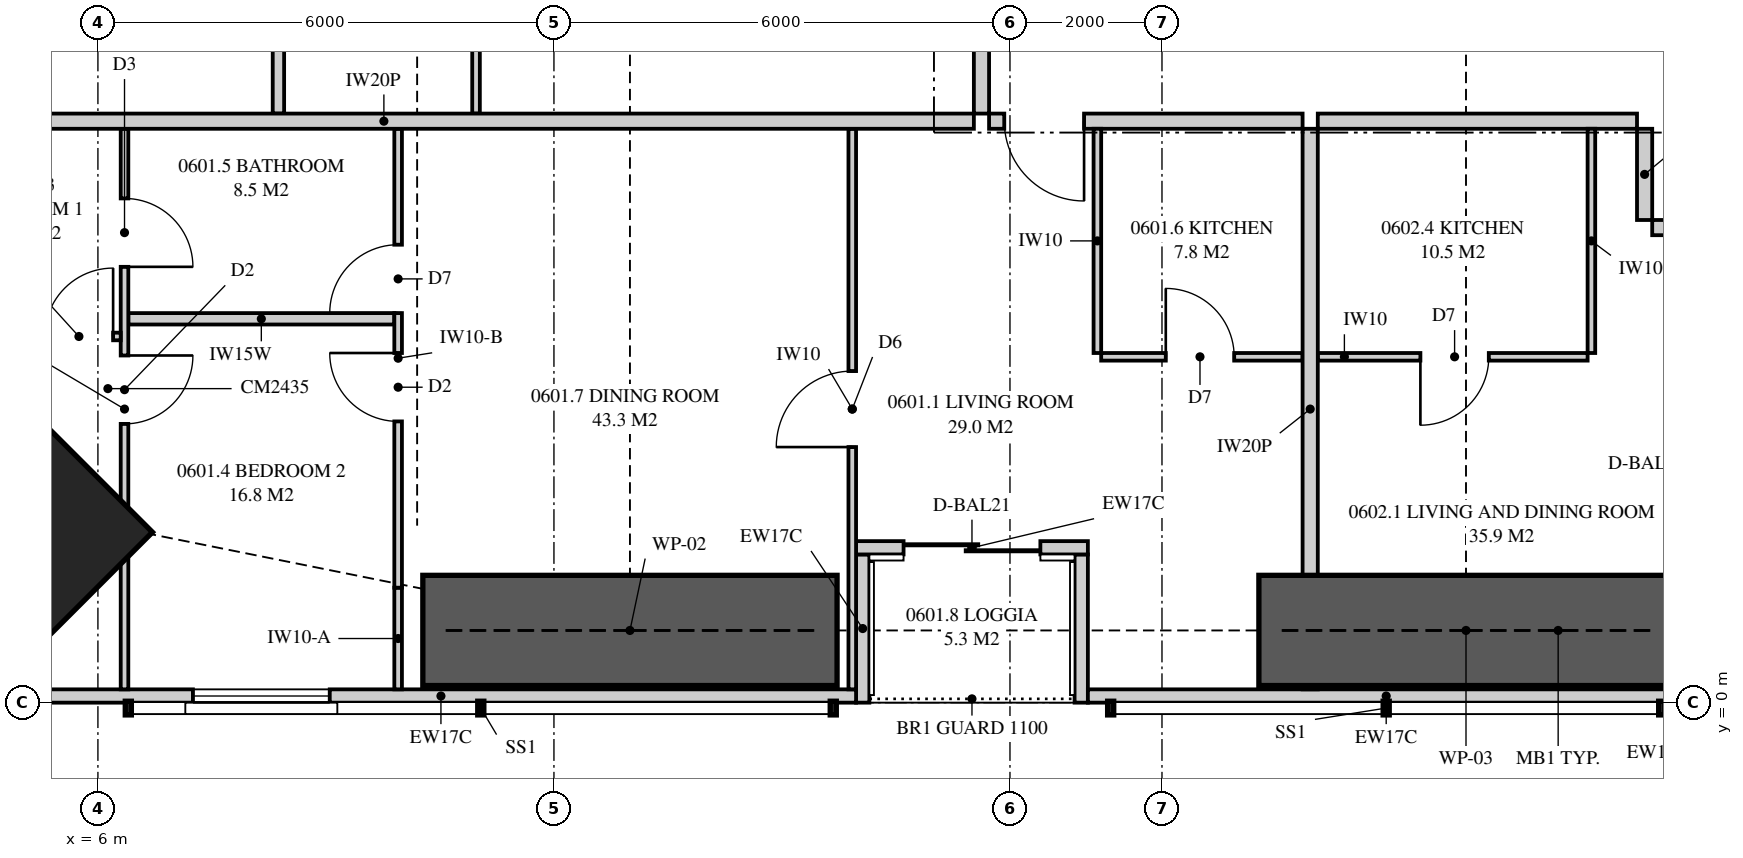
"""IFC4 building model, lengths in metres.
Left out: names, types, materials, properties, quantities, classifications, styles, units other than length and angle.
Written with IfcOpenShell. Run it as: python <this file> out.ifc"""

import sys

from ifc_helpers import new_model, si_unit, direction, frame, frame_2d, origin, origin_2d, place, context, subcontext, project, spatial, polyline, rectangle, outline, extrude, element, fill, save


model = new_model("IFC4")
c1 = context("Model", 3, precision=1e-05, world=origin(), true_north=direction((0.0, 1.0)))
c2 = subcontext(c1, "Body", "Model", "MODEL_VIEW")
j1 = project(units=[si_unit("LENGTHUNIT", "METRE"), si_unit("PLANEANGLEUNIT", "RADIAN")], contexts=[c1])
p1 = place(None, origin())
s1 = spatial("IfcSite", under=j1, at=p1, CompositionType="ELEMENT")
p2 = place(p1, origin())
s2 = spatial("IfcBuilding", under=s1, at=p2, CompositionType="ELEMENT")
p3 = place(p2, frame((0.0, 0.0, 27.7)))
s3 = spatial("IfcBuildingStorey", under=s2, at=p3, CompositionType="ELEMENT", Elevation=27.7)
p4 = place(p3, frame((4.631, 2.631, 0.0), z_axis=(0.0, 0.0, 1.0), x_axis=(0.707106781187, 0.707106781187, 0.0)))
e1 = element("IfcColumn", 1, at=p4, inside=s3, PredefinedType="COLUMN", context=c2, shape_type="SweptSolid", body=[
    extrude(rectangle(XDim=2.4, YDim=3.5, at=origin_2d()), origin(), (0.0, 0.0, 1.0), 3.35),
])
p5 = place(p3, frame((5.051, 0.087, 0.0), z_axis=(0.0, 0.0, 1.0), x_axis=(1.0, 0.0, 0.0)))
e2 = element("IfcWall", 2, at=p5, inside=s3, PredefinedType="SOLIDWALL", context=c2, shape_type="SweptSolid", body=[
    extrude(outline(polyline([(0.0, 0.0), (10.924, 0.0), (10.924, 2.15), (7.949, 2.15), (7.949, 3.11), (7.793, 3.11), (7.793, 2.15), (7.745, 2.15), (7.745, 3.11), (0.0, 3.11), (0.0, 0.0)])), frame((0.0, 0.087, 0.0), z_axis=(0.0, -1.0, 0.0), x_axis=(1.0, 0.0, 0.0)), (0.0, 0.0, 1.0), 0.175),
])
p6 = place(p5, frame((2.199, 0.0, 0.4)))
e3 = element("IfcOpeningElement", 3, at=p6, cuts=e2, PredefinedType="OPENING", context=c2, shape_type="SweptSolid", body=[
    extrude(rectangle(XDim=1.8, YDim=1.7, at=frame_2d((0.9, 0.85))), frame((0.0, 0.097, 0.0), z_axis=(0.0, -1.0, 0.0), x_axis=(1.0, 0.0, 0.0)), (0.0, 0.0, 1.0), 0.195),
])
p7 = place(p3, frame((19.025, 0.087, 0.0), z_axis=(0.0, 0.0, 1.0), x_axis=(1.0, 0.0, 0.0)))
e4 = element("IfcWall", 4, at=p7, inside=s3, PredefinedType="SOLIDWALL", context=c2, shape_type="SweptSolid", body=[
    extrude(rectangle(XDim=7.85, YDim=0.175, at=frame_2d((3.925, 0.0))), origin(), (0.0, 0.0, 1.0), 2.15),
])
p8 = place(p3, frame((15.975, 2.038, 0.0), z_axis=(0.0, 0.0, 1.0), x_axis=(1.0, 0.0, 0.0)))
e5 = element("IfcWall", 5, at=p8, inside=s3, PredefinedType="SOLIDWALL", context=c2, shape_type="SweptSolid", body=[
    extrude(rectangle(XDim=3.05, YDim=0.175, at=frame_2d((1.525, 0.0))), origin(), (0.0, 0.0, 1.0), 3.11),
])
p9 = place(p8, frame((0.625, 0.0, 0.0)))
e6 = element("IfcOpeningElement", 6, at=p9, cuts=e5, PredefinedType="OPENING", context=c2, shape_type="SweptSolid", body=[
    extrude(rectangle(XDim=1.8, YDim=2.1, at=frame_2d((0.9, 1.05))), frame((0.0, 0.097, 0.0), z_axis=(0.0, -1.0, 0.0), x_axis=(1.0, 0.0, 0.0)), (0.0, 0.0, 1.0), 0.195),
])
for number, where, z_axis, x_axis in (
    (7, (16.062, 0.0, 0.0), (0.0, 0.0, 1.0), (0.0, 1.0, 0.0)),
    (8, (18.938, 0.0, 0.0), (0.0, 0.0, 1.0), (0.0, 1.0, 0.0)),
):
    element("IfcWall", number, at=place(p3, frame(where, z_axis=z_axis, x_axis=x_axis)), inside=s3, PredefinedType="SOLIDWALL", context=c2, shape_type="SweptSolid", body=[
        extrude(outline(polyline([(0.0, 0.0), (1.95, 0.0), (1.95, 3.11), (1.75, 3.11), (1.75, 2.15), (0.15, 2.15), (0.15, 3.11), (0.0, 3.11), (0.0, 0.0)])), frame((0.0, 0.087, 0.0), z_axis=(0.0, -1.0, 0.0), x_axis=(1.0, 0.0, 0.0)), (0.0, 0.0, 1.0), 0.175),
    ])
p10 = place(p3, frame((21.95, 0.175, 0.0), z_axis=(0.0, 0.0, 1.0), x_axis=(0.0, 1.0, 0.0)))
e9 = element("IfcWall", 9, at=p10, inside=s3, PredefinedType="PARTITIONING", context=c2, shape_type="SweptSolid", body=[
    extrude(outline(polyline([(0.529, 2.15), (0.0, 2.15), (0.0, 0.0), (0.529, 0.0), (0.529, 0.09), (1.021, 0.09), (1.021, 0.0), (7.375, 0.0), (7.375, 3.11), (1.685, 3.11), (1.685, 2.15), (1.021, 2.15), (1.021, 2.06), (0.529, 2.06), (0.529, 2.15)])), frame((0.0, 0.1, 0.0), z_axis=(0.0, -1.0, 0.0), x_axis=(1.0, 0.0, 0.0)), (0.0, 0.0, 1.0), 0.2),
])
p11 = place(p3, frame((17.725, 7.65, 0.0), z_axis=(0.0, 0.0, 1.0), x_axis=(1.0, 0.0, 0.0)))
e10 = element("IfcWall", 10, at=p11, inside=s3, PredefinedType="PARTITIONING", context=c2, shape_type="SweptSolid", body=[
    extrude(rectangle(XDim=4.125, YDim=0.2, at=frame_2d((2.062, 0.0))), origin(), (0.0, 0.0, 1.0), 3.11),
])
p12 = place(p11, frame((0.2, 0.0, 0.0)))
e11 = element("IfcOpeningElement", 11, at=p12, cuts=e10, PredefinedType="OPENING", context=c2, shape_type="SweptSolid", body=[
    extrude(rectangle(XDim=1.05, YDim=2.2, at=frame_2d((0.525, 1.1))), frame((0.0, 0.11, 0.0), z_axis=(0.0, -1.0, 0.0), x_axis=(1.0, 0.0, 0.0)), (0.0, 0.0, 1.0), 0.22),
])
p13 = place(p3, frame((6.35, 0.175, 0.0), z_axis=(0.0, 0.0, 1.0), x_axis=(0.0, 1.0, 0.0)))
e12 = element("IfcWall", 12, at=p13, inside=s3, PredefinedType="PARTITIONING", context=c2, shape_type="SweptSolid", body=[
    extrude(outline(polyline([(0.0, 0.0), (7.375, 0.0), (7.375, 3.11), (2.988, 3.11), (2.988, 2.15), (1.234, 2.15), (1.234, 3.11), (0.0, 3.11), (0.0, 0.0)])), frame((0.0, 0.05, 0.0), z_axis=(0.0, -1.0, 0.0), x_axis=(1.0, 0.0, 0.0)), (0.0, 0.0, 1.0), 0.1),
])
p14 = place(p13, frame((3.492, 0.0, 0.0)))
e13 = element("IfcOpeningElement", 13, at=p14, cuts=e12, PredefinedType="OPENING", context=c2, shape_type="SweptSolid", body=[
    extrude(rectangle(XDim=0.9, YDim=2.1, at=frame_2d((0.45, 1.05))), frame((0.0, 0.06, 0.0), z_axis=(0.0, -1.0, 0.0), x_axis=(1.0, 0.0, 0.0)), (0.0, 0.0, 1.0), 0.12),
])
p15 = place(p13, frame((5.559, 0.0, 0.0)))
e14 = element("IfcOpeningElement", 14, at=p15, cuts=e12, PredefinedType="OPENING", context=c2, shape_type="SweptSolid", body=[
    extrude(rectangle(XDim=0.9, YDim=2.1, at=frame_2d((0.45, 1.05))), frame((0.0, 0.06, 0.0), z_axis=(0.0, -1.0, 0.0), x_axis=(1.0, 0.0, 0.0)), (0.0, 0.0, 1.0), 0.12),
])
p16 = place(p3, frame((9.95, 0.175, 0.0), z_axis=(0.0, 0.0, 1.0), x_axis=(0.0, 1.0, 0.0)))
e15 = element("IfcWall", 15, at=p16, inside=s3, PredefinedType="PARTITIONING", context=c2, shape_type="SweptSolid", body=[
    extrude(outline(polyline([(0.0, 0.0), (1.338, 0.0), (1.338, 2.15), (0.51, 2.15), (0.51, 3.11), (0.0, 3.11), (0.0, 0.0)])), frame((0.0, 0.05, 0.0), z_axis=(0.0, -1.0, 0.0), x_axis=(1.0, 0.0, 0.0)), (0.0, 0.0, 1.0), 0.1),
])
p17 = place(p3, frame((9.95, 1.513, 0.0), z_axis=(0.0, 0.0, 1.0), x_axis=(0.0, 1.0, 0.0)))
e16 = element("IfcWall", 16, at=p17, inside=s3, PredefinedType="PARTITIONING", context=c2, shape_type="SweptSolid", body=[
    extrude(outline(polyline([(0.0, 0.0), (6.037, 0.0), (6.037, 2.51), (0.927, 2.51), (0.927, 2.15), (0.0, 2.15), (0.0, 0.0)])), frame((0.0, 0.05, 0.0), z_axis=(0.0, -1.0, 0.0), x_axis=(1.0, 0.0, 0.0)), (0.0, 0.0, 1.0), 0.1),
])
p18 = place(p17, frame((2.188, 0.0, 0.0)))
e17 = element("IfcOpeningElement", 17, at=p18, cuts=e16, PredefinedType="OPENING", context=c2, shape_type="SweptSolid", body=[
    extrude(rectangle(XDim=0.9, YDim=2.1, at=frame_2d((0.45, 1.05))), frame((0.0, 0.06, 0.0), z_axis=(0.0, -1.0, 0.0), x_axis=(1.0, 0.0, 0.0)), (0.0, 0.0, 1.0), 0.12),
])
p19 = place(p17, frame((3.612, 0.0, 0.0)))
e18 = element("IfcOpeningElement", 18, at=p19, cuts=e16, PredefinedType="OPENING", context=c2, shape_type="SweptSolid", body=[
    extrude(rectangle(XDim=0.9, YDim=2.1, at=frame_2d((0.45, 1.05))), frame((0.0, 0.06, 0.0), z_axis=(0.0, -1.0, 0.0), x_axis=(1.0, 0.0, 0.0)), (0.0, 0.0, 1.0), 0.12),
])
p20 = place(p3, frame((2.0, 4.817, 0.0), z_axis=(0.0, 0.0, 1.0), x_axis=(1.0, 0.0, 0.0)))
e19 = element("IfcWall", 19, at=p20, inside=s3, PredefinedType="PARTITIONING", context=c2, shape_type="SweptSolid", body=[
    extrude(outline(polyline([(0.0, 0.0), (4.3, 0.0), (4.3, 3.11), (3.148, 3.11), (3.148, 2.15), (1.406, 2.15), (1.406, 3.11), (0.0, 3.11), (0.0, 0.0)])), frame((0.0, 0.05, 0.0), z_axis=(0.0, -1.0, 0.0), x_axis=(1.0, 0.0, 0.0)), (0.0, 0.0, 1.0), 0.1),
])
p21 = place(p20, frame((3.3, 0.0, 0.0)))
e20 = element("IfcOpeningElement", 20, at=p21, cuts=e19, PredefinedType="OPENING", context=c2, shape_type="SweptSolid", body=[
    extrude(rectangle(XDim=0.9, YDim=2.1, at=frame_2d((0.45, 1.05))), frame((0.0, 0.06, 0.0), z_axis=(0.0, -1.0, 0.0), x_axis=(1.0, 0.0, 0.0)), (0.0, 0.0, 1.0), 0.12),
])
p22 = place(p3, frame((6.4, 5.05, 0.0), z_axis=(0.0, 0.0, 1.0), x_axis=(1.0, 0.0, 0.0)))
e21 = element("IfcWall", 21, at=p22, inside=s3, PredefinedType="PLUMBINGWALL", context=c2, shape_type="SweptSolid", body=[
    extrude(outline(polyline([(0.0, 0.0), (3.5, 0.0), (3.5, 3.11), (3.5, 2.51), (2.515, 2.51), (2.515, 3.11), (0.0, 3.11), (0.0, 0.0)])), frame((0.0, 0.075, 0.0), z_axis=(0.0, -1.0, 0.0), x_axis=(1.0, 0.0, 0.0)), (0.0, 0.0, 1.0), 0.15),
])
p23 = place(p3, frame((19.2, 4.55, 0.0), z_axis=(0.0, 0.0, 1.0), x_axis=(1.0, 0.0, 0.0)))
e22 = element("IfcWall", 22, at=p23, inside=s3, PredefinedType="PARTITIONING", context=c2, shape_type="SweptSolid", body=[
    extrude(rectangle(XDim=2.65, YDim=0.1, at=frame_2d((1.325, 0.0))), origin(), (0.0, 0.0, 1.0), 3.11),
])
p24 = place(p23, frame((0.85, 0.0, 0.0)))
e23 = element("IfcOpeningElement", 23, at=p24, cuts=e22, PredefinedType="OPENING", context=c2, shape_type="SweptSolid", body=[
    extrude(rectangle(XDim=0.9, YDim=2.1, at=frame_2d((0.45, 1.05))), frame((0.0, 0.06, 0.0), z_axis=(0.0, -1.0, 0.0), x_axis=(1.0, 0.0, 0.0)), (0.0, 0.0, 1.0), 0.12),
])
p25 = place(p3, frame((19.15, 4.6, 0.0), z_axis=(0.0, 0.0, 1.0), x_axis=(0.0, 1.0, 0.0)))
e24 = element("IfcWall", 24, at=p25, inside=s3, PredefinedType="PARTITIONING", context=c2, shape_type="SweptSolid", body=[
    extrude(rectangle(XDim=2.95, YDim=0.1, at=frame_2d((1.475, 0.0))), origin(), (0.0, 0.0, 1.0), 3.11),
])
p26 = place(p3, frame((15.925, 0.175, 0.0), z_axis=(0.0, 0.0, 1.0), x_axis=(0.0, 1.0, 0.0)))
e25 = element("IfcWall", 25, at=p26, inside=s3, PredefinedType="PARTITIONING", context=c2, shape_type="SweptSolid", body=[
    extrude(outline(polyline([(0.0, 0.0), (7.375, 0.0), (7.375, 3.11), (1.635, 3.11), (1.635, 2.15), (0.0, 2.15), (0.0, 3.11), (0.0, 0.0)])), frame((0.0, 0.05, 0.0), z_axis=(0.0, -1.0, 0.0), x_axis=(1.0, 0.0, 0.0)), (0.0, 0.0, 1.0), 0.1),
])
p27 = place(p26, frame((3.188, 0.0, 0.0)))
e26 = element("IfcOpeningElement", 26, at=p27, cuts=e25, PredefinedType="OPENING", context=c2, shape_type="SweptSolid", body=[
    extrude(rectangle(XDim=1.0, YDim=2.1, at=frame_2d((0.5, 1.05))), frame((0.0, 0.06, 0.0), z_axis=(0.0, -1.0, 0.0), x_axis=(1.0, 0.0, 0.0)), (0.0, 0.0, 1.0), 0.12),
])
p28 = place(p3, frame((22.05, 7.65, 0.0), z_axis=(0.0, 0.0, 1.0), x_axis=(1.0, 0.0, 0.0)))
e27 = element("IfcWall", 27, at=p28, inside=s3, PredefinedType="PARTITIONING", context=c2, shape_type="SweptSolid", body=[
    extrude(outline(polyline([(0.0, 0.0), (4.2, 0.0), (4.2, 3.11), (2.287, 3.11), (2.287, 2.541), (1.613, 2.541), (1.613, 3.11), (0.0, 3.11), (0.0, 0.0)])), frame((0.0, 0.1, 0.0), z_axis=(0.0, -1.0, 0.0), x_axis=(1.0, 0.0, 0.0)), (0.0, 0.0, 1.0), 0.2),
])
p29 = place(p3, frame((22.05, 4.55, 0.0), z_axis=(0.0, 0.0, 1.0), x_axis=(1.0, 0.0, 0.0)))
e28 = element("IfcWall", 28, at=p29, inside=s3, PredefinedType="PARTITIONING", context=c2, shape_type="SweptSolid", body=[
    extrude(outline(polyline([(0.0, 0.0), (3.55, 0.0), (3.55, 3.11), (2.237, 3.11), (2.237, 2.541), (1.663, 2.541), (1.663, 3.11), (0.0, 3.11), (0.0, 0.0)])), frame((0.0, 0.05, 0.0), z_axis=(0.0, -1.0, 0.0), x_axis=(1.0, 0.0, 0.0)), (0.0, 0.0, 1.0), 0.1),
])
p30 = place(p29, frame((1.35, 0.0, 0.0)))
e29 = element("IfcOpeningElement", 29, at=p30, cuts=e28, PredefinedType="OPENING", context=c2, shape_type="SweptSolid", body=[
    extrude(rectangle(XDim=0.9, YDim=2.1, at=frame_2d((0.45, 1.05))), frame((0.0, 0.06, 0.0), z_axis=(0.0, -1.0, 0.0), x_axis=(1.0, 0.0, 0.0)), (0.0, 0.0, 1.0), 0.12),
])
p31 = place(p3, frame((25.65, 4.6, 0.0), z_axis=(0.0, 0.0, 1.0), x_axis=(0.0, 1.0, 0.0)))
e30 = element("IfcWall", 30, at=p31, inside=s3, PredefinedType="PARTITIONING", context=c2, shape_type="SweptSolid", body=[
    extrude(rectangle(XDim=2.95, YDim=0.1, at=frame_2d((1.475, 0.0))), origin(), (0.0, 0.0, 1.0), 3.11),
])
p32 = place(p3, frame((2.0, 7.65, 0.0), z_axis=(0.0, 0.0, 1.0), x_axis=(1.0, 0.0, 0.0)))
e31 = element("IfcWall", 31, at=p32, inside=s3, PredefinedType="PARTITIONING", context=c2, shape_type="SweptSolid", body=[
    extrude(outline(polyline([(0.0, 0.0), (15.525, 0.0), (15.525, 3.11), (11.337, 3.11), (11.337, 2.541), (10.663, 2.541), (10.663, 3.11), (9.51, 3.11), (9.51, 2.51), (6.89, 2.51), (6.89, 3.11), (2.969, 3.11), (2.969, 2.541), (2.74, 2.541), (2.74, 2.15), (0.896, 2.15), (0.896, 3.11), (0.0, 3.11), (0.0, 0.0)])), frame((0.0, 0.1, 0.0), z_axis=(0.0, -1.0, 0.0), x_axis=(1.0, 0.0, 0.0)), (0.0, 0.0, 1.0), 0.2),
])
p33 = place(p3, frame((17.625, 7.75, 0.0), z_axis=(0.0, 0.0, 1.0), x_axis=(0.0, 1.0, 0.0)))
e32 = element("IfcWall", 32, at=p33, inside=s3, PredefinedType="PARTITIONING", context=c2, shape_type="SweptSolid", body=[
    extrude(outline(polyline([(0.0, 0.0), (9.35, 0.0), (9.35, 3.11), (5.587, 3.11), (5.587, 2.541), (4.913, 2.541), (4.913, 3.11), (0.0, 3.11), (0.0, 0.0)])), frame((0.0, 0.1, 0.0), z_axis=(0.0, -1.0, 0.0), x_axis=(1.0, 0.0, 0.0)), (0.0, 0.0, 1.0), 0.2),
])
p34 = place(p3, frame((8.375, 7.75, 0.0), z_axis=(0.0, 0.0, 1.0), x_axis=(0.0, 1.0, 0.0)))
e33 = element("IfcWall", 33, at=p34, inside=s3, PredefinedType="PLUMBINGWALL", context=c2, shape_type="SweptSolid", body=[
    extrude(rectangle(XDim=3.45, YDim=0.15, at=frame_2d((1.725, 0.0))), origin(), (0.0, 0.0, 1.0), 3.11),
])
p35 = place(p3, frame((10.975, 7.75, 0.0), z_axis=(0.0, 0.0, 1.0), x_axis=(0.0, 1.0, 0.0)))
e34 = element("IfcWall", 34, at=p35, inside=s3, PredefinedType="PARTITIONING", context=c2, shape_type="SweptSolid", body=[
    extrude(outline(polyline([(0.0, 0.0), (3.45, 0.0), (3.45, 3.11), (3.45, 2.51), (0.0, 2.51), (0.0, 3.11), (0.0, 0.0)])), frame((0.0, 0.05, 0.0), z_axis=(0.0, -1.0, 0.0), x_axis=(1.0, 0.0, 0.0)), (0.0, 0.0, 1.0), 0.1),
])
p36 = place(p3, frame((26.45, 6.25, 0.0), z_axis=(0.0, 0.0, 1.0), x_axis=(1.0, 0.0, 0.0)))
e35 = element("IfcWall", 35, at=p36, inside=s3, PredefinedType="PARTITIONING", context=c2, shape_type="SweptSolid", body=[
    extrude(rectangle(XDim=2.4, YDim=0.2, at=frame_2d((1.2, 0.0))), origin(), (0.0, 0.0, 1.0), 3.11),
])
p37 = place(p36, frame((0.7, 0.0, 0.0)))
e36 = element("IfcOpeningElement", 36, at=p37, cuts=e35, PredefinedType="OPENING", context=c2, shape_type="SweptSolid", body=[
    extrude(rectangle(XDim=1.05, YDim=2.2, at=frame_2d((0.525, 1.1))), frame((0.0, 0.11, 0.0), z_axis=(0.0, -1.0, 0.0), x_axis=(1.0, 0.0, 0.0)), (0.0, 0.0, 1.0), 0.22),
])
p38 = place(p3, frame((26.35, 7.55, 0.0), z_axis=(0.0, 0.0, 1.0), x_axis=(0.0, -1.0, 0.0)))
e37 = element("IfcWall", 37, at=p38, inside=s3, PredefinedType="PARTITIONING", context=c2, shape_type="SweptSolid", body=[
    extrude(rectangle(XDim=1.2, YDim=0.2, at=frame_2d((0.6, 0.0))), origin(), (0.0, 0.0, 1.0), 3.11),
])
for number, where, z_axis, x_axis in (
    (38, (10.275, 0.95, 0.0), (0.0, 0.0, 1.0), (1.0, 0.0, 0.0)),
    (39, (21.275, 0.95, 0.0), (0.0, 0.0, 1.0), (1.0, 0.0, 0.0)),
):
    element("IfcWall", number, at=place(p3, frame(where, z_axis=z_axis, x_axis=x_axis)), inside=s3, PredefinedType="SHEAR", context=c2, shape_type="SweptSolid", body=[
        extrude(rectangle(XDim=5.45, YDim=1.45, at=frame_2d((2.725, 0.0))), origin(), (0.0, 0.0, 1.0), 3.35),
    ])
p39 = place(p6, origin())
e40 = element("IfcWindow", 40, at=p39, inside=s3, PartitioningType="SINGLE_PANEL", PredefinedType="WINDOW", context=c2, shape_type="SweptSolid", body=[
    extrude(rectangle(XDim=1.8, YDim=1.7, at=frame_2d((0.9, 0.85))), frame((0.0, 0.03, 0.0), z_axis=(0.0, -1.0, 0.0), x_axis=(1.0, 0.0, 0.0)), (0.0, 0.0, 1.0), 0.06),
])
fill(e3, e40)
p40 = place(p9, origin())
e41 = element("IfcDoor", 41, at=p40, inside=s3, OperationType="SLIDING_TO_LEFT", PredefinedType="DOOR", context=c2, shape_type="SweptSolid", body=[
    extrude(rectangle(XDim=1.8, YDim=2.1, at=frame_2d((0.9, 1.05))), frame((0.0, 0.025, 0.0), z_axis=(0.0, -1.0, 0.0), x_axis=(1.0, 0.0, 0.0)), (0.0, 0.0, 1.0), 0.05),
])
fill(e6, e41)
p41 = place(p12, frame((1.05, 0.0, 0.0), z_axis=(0.0, 0.0, 1.0), x_axis=(-1.0, 0.0, 0.0)))
e42 = element("IfcDoor", 42, at=p41, inside=s3, OperationType="SINGLE_SWING_LEFT", PredefinedType="DOOR", context=c2, shape_type="SweptSolid", body=[
    extrude(rectangle(XDim=1.05, YDim=2.2, at=frame_2d((0.525, 1.1))), frame((0.0, 0.025, 0.0), z_axis=(0.0, -1.0, 0.0), x_axis=(1.0, 0.0, 0.0)), (0.0, 0.0, 1.0), 0.05),
])
fill(e11, e42)
p42 = place(p21, origin())
e43 = element("IfcDoor", 43, at=p42, inside=s3, OperationType="SINGLE_SWING_RIGHT", PredefinedType="DOOR", context=c2, shape_type="SweptSolid", body=[
    extrude(rectangle(XDim=0.9, YDim=2.1, at=frame_2d((0.45, 1.05))), frame((0.0, 0.025, 0.0), z_axis=(0.0, -1.0, 0.0), x_axis=(1.0, 0.0, 0.0)), (0.0, 0.0, 1.0), 0.05),
])
fill(e20, e43)
p43 = place(p14, frame((0.9, 0.0, 0.0), z_axis=(0.0, 0.0, 1.0), x_axis=(-1.0, 0.0, 0.0)))
e44 = element("IfcDoor", 44, at=p43, inside=s3, OperationType="SINGLE_SWING_LEFT", PredefinedType="DOOR", context=c2, shape_type="SweptSolid", body=[
    extrude(rectangle(XDim=0.9, YDim=2.1, at=frame_2d((0.45, 1.05))), frame((0.0, 0.025, 0.0), z_axis=(0.0, -1.0, 0.0), x_axis=(1.0, 0.0, 0.0)), (0.0, 0.0, 1.0), 0.05),
])
fill(e13, e44)
p44 = place(p18, origin())
e45 = element("IfcDoor", 45, at=p44, inside=s3, OperationType="SINGLE_SWING_RIGHT", PredefinedType="DOOR", context=c2, shape_type="SweptSolid", body=[
    extrude(rectangle(XDim=0.9, YDim=2.1, at=frame_2d((0.45, 1.05))), frame((0.0, 0.025, 0.0), z_axis=(0.0, -1.0, 0.0), x_axis=(1.0, 0.0, 0.0)), (0.0, 0.0, 1.0), 0.05),
])
fill(e17, e45)
p45 = place(p19, origin())
e46 = element("IfcDoor", 46, at=p45, inside=s3, OperationType="SINGLE_SWING_LEFT", PredefinedType="DOOR", context=c2, shape_type="SweptSolid", body=[
    extrude(rectangle(XDim=0.9, YDim=2.1, at=frame_2d((0.45, 1.05))), frame((0.0, 0.025, 0.0), z_axis=(0.0, -1.0, 0.0), x_axis=(1.0, 0.0, 0.0)), (0.0, 0.0, 1.0), 0.05),
])
fill(e18, e46)
p46 = place(p15, frame((0.9, 0.0, 0.0), z_axis=(0.0, 0.0, 1.0), x_axis=(-1.0, 0.0, 0.0)))
e47 = element("IfcDoor", 47, at=p46, inside=s3, OperationType="SINGLE_SWING_RIGHT", PredefinedType="DOOR", context=c2, shape_type="SweptSolid", body=[
    extrude(rectangle(XDim=0.9, YDim=2.1, at=frame_2d((0.45, 1.05))), frame((0.0, 0.025, 0.0), z_axis=(0.0, -1.0, 0.0), x_axis=(1.0, 0.0, 0.0)), (0.0, 0.0, 1.0), 0.05),
])
fill(e14, e47)
p47 = place(p24, origin())
e48 = element("IfcDoor", 48, at=p47, inside=s3, OperationType="SINGLE_SWING_LEFT", PredefinedType="DOOR", context=c2, shape_type="SweptSolid", body=[
    extrude(rectangle(XDim=0.9, YDim=2.1, at=frame_2d((0.45, 1.05))), frame((0.0, 0.025, 0.0), z_axis=(0.0, -1.0, 0.0), x_axis=(1.0, 0.0, 0.0)), (0.0, 0.0, 1.0), 0.05),
])
fill(e23, e48)
p48 = place(p27, origin())
e49 = element("IfcDoor", 49, at=p48, inside=s3, OperationType="SINGLE_SWING_LEFT", PredefinedType="DOOR", context=c2, shape_type="SweptSolid", body=[
    extrude(rectangle(XDim=1.0, YDim=2.1, at=frame_2d((0.5, 1.05))), frame((0.0, 0.025, 0.0), z_axis=(0.0, -1.0, 0.0), x_axis=(1.0, 0.0, 0.0)), (0.0, 0.0, 1.0), 0.05),
])
fill(e26, e49)
p49 = place(p30, frame((0.9, 0.0, 0.0), z_axis=(0.0, 0.0, 1.0), x_axis=(-1.0, 0.0, 0.0)))
e50 = element("IfcDoor", 50, at=p49, inside=s3, OperationType="SINGLE_SWING_RIGHT", PredefinedType="DOOR", context=c2, shape_type="SweptSolid", body=[
    extrude(rectangle(XDim=0.9, YDim=2.1, at=frame_2d((0.45, 1.05))), frame((0.0, 0.025, 0.0), z_axis=(0.0, -1.0, 0.0), x_axis=(1.0, 0.0, 0.0)), (0.0, 0.0, 1.0), 0.05),
])
fill(e29, e50)
save(model, sys.argv[1])
